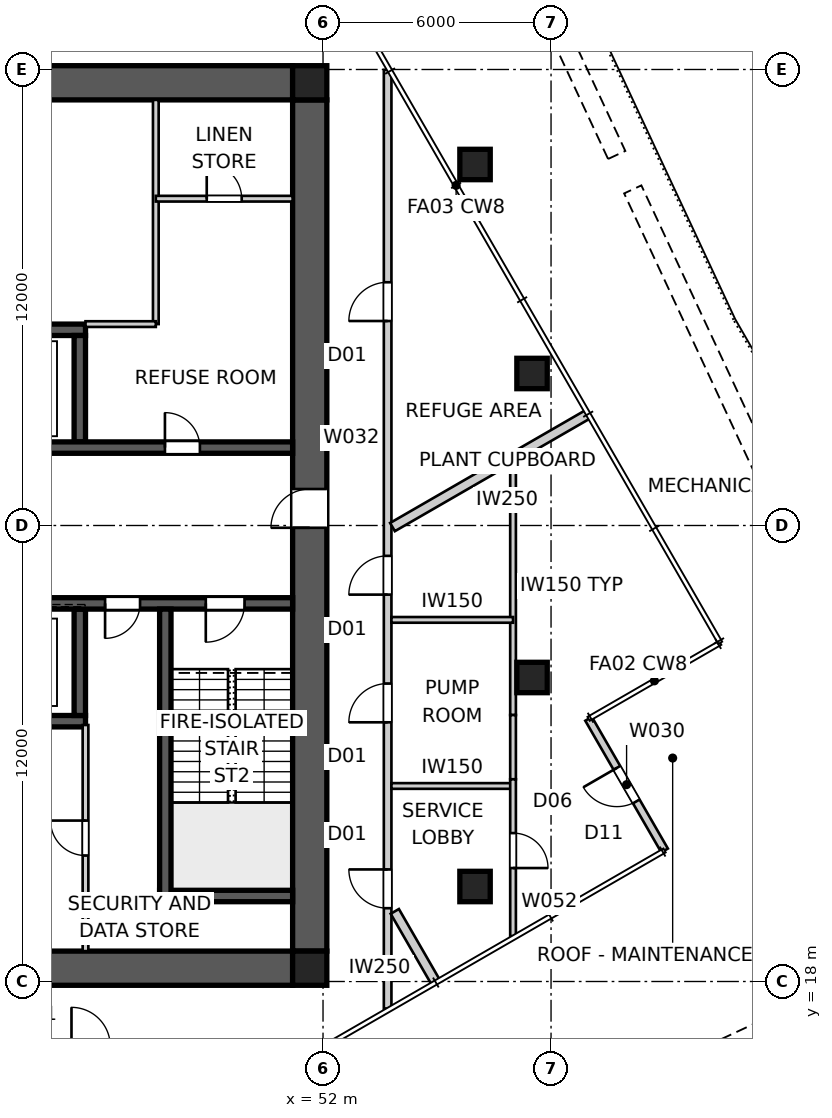
"""IFC4 building model, lengths in metres.
Left out: names, types, materials, properties, quantities, classifications, styles, units other than length and angle.
Written with IfcOpenShell. Run it as: python <this file> out.ifc"""

import sys

from ifc_helpers import new_model, si_unit, direction, frame, frame_2d, origin, origin_2d, place, context, subcontext, project, spatial, polyline, rectangle, outline, extrude, element, fill, save


model = new_model("IFC4")
c1 = context("Model", 3, precision=1e-05, world=origin(), true_north=direction((0.0, 1.0)))
c2 = subcontext(c1, "Body", "Model", "MODEL_VIEW")
j1 = project(units=[si_unit("LENGTHUNIT", "METRE"), si_unit("PLANEANGLEUNIT", "RADIAN")], contexts=[c1])
p1 = place(None, origin())
s1 = spatial("IfcSite", under=j1, at=p1, CompositionType="ELEMENT")
p2 = place(p1, origin())
s2 = spatial("IfcBuilding", under=s1, at=p2, CompositionType="ELEMENT")
p3 = place(p2, frame((0.0, 0.0, 203.2)))
s3 = spatial("IfcBuildingStorey", under=s2, at=p3, CompositionType="ELEMENT", Elevation=203.2)
for number, where, z_axis, x_axis in (
    (1, (28.8, 41.65, 0.0), (0.0, 0.0, 1.0), (1.0, 0.0, 0.0)),
    (2, (51.2, 18.35, 0.0), (0.0, 0.0, 1.0), (-1.0, 0.0, 0.0)),
):
    element("IfcWall", number, at=place(p3, frame(where, z_axis=z_axis, x_axis=x_axis)), inside=s3, PredefinedType="SHEAR", context=c2, shape_type="SweptSolid", body=[
        extrude(outline(polyline([(0.0, -0.45), (22.4, -0.45), (22.4, -0.025), (22.85, -0.025), (22.85, 0.025), (22.4, 0.025), (22.4, 0.45), (0.0, 0.45), (0.0, 0.025), (-0.45, 0.025), (-0.45, -0.025), (0.0, -0.025), (0.0, -0.45)])), origin(), (0.0, 0.0, 1.0), 5.0),
    ])
p4 = place(p3, frame((51.65, 18.8, 0.0), z_axis=(0.0, 0.0, 1.0), x_axis=(0.0, 1.0, 0.0)))
e3 = element("IfcWall", 3, at=p4, inside=s3, PredefinedType="SHEAR", context=c2, shape_type="SweptSolid", body=[
    extrude(outline(polyline([(0.0, -0.45), (22.4, -0.45), (22.4, -0.025), (22.85, -0.025), (22.85, 0.025), (22.4, 0.025), (22.4, 0.45), (0.0, 0.45), (0.0, 0.025), (-0.45, 0.025), (-0.45, -0.025), (0.0, -0.025), (0.0, -0.45)])), origin(), (0.0, 0.0, 1.0), 5.0),
])
p5 = place(p4, frame((11.14, 0.0, 0.0)))
e4 = element("IfcOpeningElement", 4, at=p5, cuts=e3, PredefinedType="OPENING", context=c2, shape_type="SweptSolid", body=[
    extrude(rectangle(XDim=1.02, YDim=2.4, at=frame_2d((0.51, 1.2))), frame((0.0, 0.46, 0.0), z_axis=(0.0, -1.0, 0.0), x_axis=(1.0, 0.0, 0.0)), (0.0, 0.0, 1.0), 0.92),
])
p6 = place(p3, frame((28.8, 32.05, 0.0), z_axis=(0.0, 0.0, 1.0), x_axis=(1.0, 0.0, 0.0)))
e5 = element("IfcWall", 5, at=p6, inside=s3, PredefinedType="SHEAR", context=c2, shape_type="SweptSolid", body=[
    extrude(rectangle(XDim=22.4, YDim=0.3, at=frame_2d((11.2, 0.0))), origin(), (0.0, 0.0, 1.0), 5.0),
])
p7 = place(p6, frame((19.04, 0.0, 0.0)))
e6 = element("IfcOpeningElement", 6, at=p7, cuts=e5, PredefinedType="OPENING", context=c2, shape_type="SweptSolid", body=[
    extrude(rectangle(XDim=0.92, YDim=2.1, at=frame_2d((0.46, 1.05))), frame((0.0, 0.16, 0.0), z_axis=(0.0, -1.0, 0.0), x_axis=(1.0, 0.0, 0.0)), (0.0, 0.0, 1.0), 0.32),
])
p8 = place(p6, frame((1.265, 0.0, 0.0)))
e7 = element("IfcOpeningElement", 7, at=p8, cuts=e5, PredefinedType="OPENING", context=c2, shape_type="SweptSolid", body=[
    extrude(rectangle(XDim=1.02, YDim=2.1, at=frame_2d((0.51, 1.05))), frame((0.0, 0.16, 0.0), z_axis=(0.0, -1.0, 0.0), x_axis=(1.0, 0.0, 0.0)), (0.0, 0.0, 1.0), 0.32),
])
p9 = place(p6, frame((4.015, 0.0, 0.0)))
e8 = element("IfcOpeningElement", 8, at=p9, cuts=e5, PredefinedType="OPENING", context=c2, shape_type="SweptSolid", body=[
    extrude(rectangle(XDim=0.92, YDim=2.1, at=frame_2d((0.46, 1.05))), frame((0.0, 0.16, 0.0), z_axis=(0.0, -1.0, 0.0), x_axis=(1.0, 0.0, 0.0)), (0.0, 0.0, 1.0), 0.32),
])
p10 = place(p6, frame((7.015, 0.0, 0.0)))
e9 = element("IfcOpeningElement", 9, at=p10, cuts=e5, PredefinedType="OPENING", context=c2, shape_type="SweptSolid", body=[
    extrude(rectangle(XDim=0.92, YDim=2.1, at=frame_2d((0.46, 1.05))), frame((0.0, 0.16, 0.0), z_axis=(0.0, -1.0, 0.0), x_axis=(1.0, 0.0, 0.0)), (0.0, 0.0, 1.0), 0.32),
])
p11 = place(p6, frame((9.34, 0.0, 0.0)))
e10 = element("IfcOpeningElement", 10, at=p11, cuts=e5, PredefinedType="OPENING", context=c2, shape_type="SweptSolid", body=[
    extrude(rectangle(XDim=0.92, YDim=2.1, at=frame_2d((0.46, 1.05))), frame((0.0, 0.16, 0.0), z_axis=(0.0, -1.0, 0.0), x_axis=(1.0, 0.0, 0.0)), (0.0, 0.0, 1.0), 0.32),
])
p12 = place(p6, frame((14.85, 0.0, 0.0)))
e11 = element("IfcOpeningElement", 11, at=p12, cuts=e5, PredefinedType="OPENING", context=c2, shape_type="SweptSolid", body=[
    extrude(rectangle(XDim=1.1, YDim=2.1, at=frame_2d((0.55, 1.05))), frame((0.0, 0.16, 0.0), z_axis=(0.0, -1.0, 0.0), x_axis=(1.0, 0.0, 0.0)), (0.0, 0.0, 1.0), 0.32),
])
p13 = place(p3, frame((51.2, 27.95, 0.0), z_axis=(0.0, 0.0, 1.0), x_axis=(-1.0, 0.0, 0.0)))
e12 = element("IfcWall", 12, at=p13, inside=s3, PredefinedType="SHEAR", context=c2, shape_type="SweptSolid", body=[
    extrude(rectangle(XDim=22.4, YDim=0.3, at=frame_2d((11.2, 0.0))), origin(), (0.0, 0.0, 1.0), 5.0),
])
p14 = place(p13, frame((19.04, 0.0, 0.0)))
e13 = element("IfcOpeningElement", 13, at=p14, cuts=e12, PredefinedType="OPENING", context=c2, shape_type="SweptSolid", body=[
    extrude(rectangle(XDim=0.92, YDim=2.1, at=frame_2d((0.46, 1.05))), frame((0.0, 0.16, 0.0), z_axis=(0.0, -1.0, 0.0), x_axis=(1.0, 0.0, 0.0)), (0.0, 0.0, 1.0), 0.32),
])
p15 = place(p13, frame((1.265, 0.0, 0.0)))
e14 = element("IfcOpeningElement", 14, at=p15, cuts=e12, PredefinedType="OPENING", context=c2, shape_type="SweptSolid", body=[
    extrude(rectangle(XDim=1.02, YDim=2.1, at=frame_2d((0.51, 1.05))), frame((0.0, 0.16, 0.0), z_axis=(0.0, -1.0, 0.0), x_axis=(1.0, 0.0, 0.0)), (0.0, 0.0, 1.0), 0.32),
])
p16 = place(p13, frame((4.015, 0.0, 0.0)))
e15 = element("IfcOpeningElement", 15, at=p16, cuts=e12, PredefinedType="OPENING", context=c2, shape_type="SweptSolid", body=[
    extrude(rectangle(XDim=0.92, YDim=2.1, at=frame_2d((0.46, 1.05))), frame((0.0, 0.16, 0.0), z_axis=(0.0, -1.0, 0.0), x_axis=(1.0, 0.0, 0.0)), (0.0, 0.0, 1.0), 0.32),
])
p17 = place(p13, frame((6.45, 0.0, 0.0)))
e16 = element("IfcOpeningElement", 16, at=p17, cuts=e12, PredefinedType="OPENING", context=c2, shape_type="SweptSolid", body=[
    extrude(rectangle(XDim=1.1, YDim=2.1, at=frame_2d((0.55, 1.05))), frame((0.0, 0.16, 0.0), z_axis=(0.0, -1.0, 0.0), x_axis=(1.0, 0.0, 0.0)), (0.0, 0.0, 1.0), 0.32),
])
p18 = place(p13, frame((9.25, 0.0, 0.0)))
e17 = element("IfcOpeningElement", 17, at=p18, cuts=e12, PredefinedType="OPENING", context=c2, shape_type="SweptSolid", body=[
    extrude(rectangle(XDim=1.1, YDim=2.1, at=frame_2d((0.55, 1.05))), frame((0.0, 0.16, 0.0), z_axis=(0.0, -1.0, 0.0), x_axis=(1.0, 0.0, 0.0)), (0.0, 0.0, 1.0), 0.32),
])
p19 = place(p13, frame((14.85, 0.0, 0.0)))
e18 = element("IfcOpeningElement", 18, at=p19, cuts=e12, PredefinedType="OPENING", context=c2, shape_type="SweptSolid", body=[
    extrude(rectangle(XDim=1.1, YDim=2.1, at=frame_2d((0.55, 1.05))), frame((0.0, 0.16, 0.0), z_axis=(0.0, -1.0, 0.0), x_axis=(1.0, 0.0, 0.0)), (0.0, 0.0, 1.0), 0.32),
])
for number, where, z_axis, x_axis in (
    (19, (34.25, 35.15, 0.0), (0.0, 0.0, 1.0), (1.0, 0.0, 0.0)),
    (20, (45.75, 24.85, 0.0), (0.0, 0.0, 1.0), (-1.0, 0.0, 0.0)),
):
    element("IfcWall", number, at=place(p3, frame(where, z_axis=z_axis, x_axis=x_axis)), inside=s3, PredefinedType="SHEAR", context=c2, shape_type="SweptSolid", body=[
        extrude(rectangle(XDim=11.5, YDim=0.3, at=frame_2d((5.75, 0.0))), origin(), (0.0, 0.0, 1.0), 5.0),
    ])
for number, where, z_axis, x_axis in (
    (21, (45.6, 27.8, 0.0), (0.0, 0.0, 1.0), (0.0, -1.0, 0.0)),
    (22, (45.6, 32.2, 0.0), (0.0, 0.0, 1.0), (0.0, 1.0, 0.0)),
):
    element("IfcWall", number, at=place(p3, frame(where, z_axis=z_axis, x_axis=x_axis)), inside=s3, PredefinedType="SHEAR", context=c2, shape_type="SweptSolid", body=[
        extrude(rectangle(XDim=2.8, YDim=0.3, at=frame_2d((1.4, 0.0))), origin(), (0.0, 0.0, 1.0), 5.0),
    ])
p20 = place(p3, frame((47.85, 27.8, 0.0), z_axis=(0.0, 0.0, 1.0), x_axis=(0.0, -1.0, 0.0)))
e23 = element("IfcWall", 23, at=p20, inside=s3, PredefinedType="SHEAR", context=c2, shape_type="SweptSolid", body=[
    extrude(rectangle(XDim=7.7, YDim=0.3, at=frame_2d((3.85, 0.0))), origin(), (0.0, 0.0, 1.0), 5.0),
])
p21 = place(p3, frame((51.2, 20.25, 0.0), z_axis=(0.0, 0.0, 1.0), x_axis=(-1.0, 0.0, 0.0)))
e24 = element("IfcWall", 24, at=p21, inside=s3, PredefinedType="SHEAR", context=c2, shape_type="SweptSolid", body=[
    extrude(rectangle(XDim=3.5, YDim=0.3, at=frame_2d((1.75, 0.0))), origin(), (0.0, 0.0, 1.0), 5.0),
])
for number, where, z_axis, x_axis in (
    (25, (51.65, 18.35, 0.0), (0.0, 0.0, 1.0), (1.0, 0.0, 0.0)),
    (26, (51.65, 41.65, 0.0), (0.0, 0.0, 1.0), (1.0, 0.0, 0.0)),
):
    element("IfcColumn", number, at=place(p3, frame(where, z_axis=z_axis, x_axis=x_axis)), inside=s3, PredefinedType="COLUMN", context=c2, shape_type="SweptSolid", body=[
        extrude(rectangle(XDim=0.9, YDim=0.9, at=origin_2d()), origin(), (0.0, 0.0, 1.0), 5.0),
    ])
for number, where, z_axis, x_axis in (
    (27, (57.5, 26.0, 0.0), (0.0, 0.0, 1.0), (1.0, 0.0, 0.0)),
    (28, (57.5, 34.0, 0.0), (0.0, 0.0, 1.0), (1.0, 0.0, 0.0)),
    (29, (56.0, 39.5, 0.0), (0.0, 0.0, 1.0), (1.0, 0.0, 0.0)),
    (30, (56.0, 20.5, 0.0), (0.0, 0.0, 1.0), (1.0, 0.0, 0.0)),
):
    element("IfcColumn", number, at=place(p3, frame(where, z_axis=z_axis, x_axis=x_axis)), inside=s3, PredefinedType="COLUMN", context=c2, shape_type="SweptSolid", body=[
        extrude(rectangle(XDim=0.8, YDim=0.8, at=origin_2d()), origin(), (0.0, 0.0, 1.0), 5.0),
    ])
p22 = place(p3, frame((60.988, 21.448, 0.0), z_axis=(0.0, 0.0, 1.0), x_axis=(-0.49999894854, 0.866026010844, 0.0)))
e31 = element("IfcWall", 31, at=p22, inside=s3, PredefinedType="SOLIDWALL", context=c2, shape_type="SweptSolid", body=[
    extrude(rectangle(XDim=4.0, YDim=0.2, at=frame_2d((2.0, 0.0))), origin(), (0.0, 0.0, 1.0), 4.85),
])
p23 = place(p22, frame((1.49, 0.0, 0.0)))
e32 = element("IfcOpeningElement", 32, at=p23, cuts=e31, PredefinedType="OPENING", context=c2, shape_type="SweptSolid", body=[
    extrude(rectangle(XDim=1.02, YDim=2.1, at=frame_2d((0.51, 1.05))), frame((0.0, 0.11, 0.0), z_axis=(0.0, -1.0, 0.0), x_axis=(1.0, 0.0, 0.0)), (0.0, 0.0, 1.0), 0.22),
])
p24 = place(p3, frame((53.7, 17.287, 0.0), z_axis=(0.0, 0.0, 1.0), x_axis=(0.0, 1.0, 0.0)))
e33 = element("IfcWall", 33, at=p24, inside=s3, PredefinedType="PARTITIONING", context=c2, shape_type="SweptSolid", body=[
    extrude(rectangle(XDim=24.704, YDim=0.2, at=frame_2d((12.352, 0.0))), origin(), (0.0, 0.0, 1.0), 4.85),
])
p25 = place(p24, frame((18.094, 0.0, 0.0)))
e34 = element("IfcOpeningElement", 34, at=p25, cuts=e33, PredefinedType="OPENING", context=c2, shape_type="SweptSolid", body=[
    extrude(rectangle(XDim=1.02, YDim=2.34, at=frame_2d((0.51, 1.17))), frame((0.0, 0.11, 0.0), z_axis=(0.0, -1.0, 0.0), x_axis=(1.0, 0.0, 0.0)), (0.0, 0.0, 1.0), 0.22),
])
p26 = place(p24, frame((2.642, 0.0, 0.0)))
e35 = element("IfcOpeningElement", 35, at=p26, cuts=e33, PredefinedType="OPENING", context=c2, shape_type="SweptSolid", body=[
    extrude(rectangle(XDim=1.02, YDim=2.34, at=frame_2d((0.51, 1.17))), frame((0.0, 0.11, 0.0), z_axis=(0.0, -1.0, 0.0), x_axis=(1.0, 0.0, 0.0)), (0.0, 0.0, 1.0), 0.22),
])
p27 = place(p24, frame((7.534, 0.0, 0.0)))
e36 = element("IfcOpeningElement", 36, at=p27, cuts=e33, PredefinedType="OPENING", context=c2, shape_type="SweptSolid", body=[
    extrude(rectangle(XDim=1.02, YDim=2.34, at=frame_2d((0.51, 1.17))), frame((0.0, 0.11, 0.0), z_axis=(0.0, -1.0, 0.0), x_axis=(1.0, 0.0, 0.0)), (0.0, 0.0, 1.0), 0.22),
])
p28 = place(p24, frame((10.894, 0.0, 0.0)))
e37 = element("IfcOpeningElement", 37, at=p28, cuts=e33, PredefinedType="OPENING", context=c2, shape_type="SweptSolid", body=[
    extrude(rectangle(XDim=1.02, YDim=2.34, at=frame_2d((0.51, 1.17))), frame((0.0, 0.11, 0.0), z_axis=(0.0, -1.0, 0.0), x_axis=(1.0, 0.0, 0.0)), (0.0, 0.0, 1.0), 0.22),
])
p29 = place(p3, frame((54.969, 17.973, 0.0), z_axis=(0.0, 0.0, 1.0), x_axis=(-0.500087501723, 0.865974878747, 0.0)))
e38 = element("IfcWall", 38, at=p29, inside=s3, PredefinedType="PARTITIONING", context=c2, shape_type="SweptSolid", body=[
    extrude(rectangle(XDim=2.161, YDim=0.25, at=frame_2d((1.081, 0.0))), origin(), (0.0, 0.0, 1.0), 4.85),
])
p30 = place(p3, frame((58.977, 32.931, 0.0), z_axis=(0.0, 0.0, 1.0), x_axis=(-0.866013262469, -0.500021028785, 0.0)))
e39 = element("IfcWall", 39, at=p30, inside=s3, PredefinedType="PARTITIONING", context=c2, shape_type="SweptSolid", body=[
    extrude(rectangle(XDim=5.946, YDim=0.25, at=frame_2d((2.973, 0.0))), origin(), (0.0, 0.0, 1.0), 4.85),
])
p31 = place(p3, frame((47.6, 41.2, 0.0), z_axis=(0.0, 0.0, 1.0), x_axis=(0.0, -1.0, 0.0)))
e40 = element("IfcWall", 40, at=p31, inside=s3, PredefinedType="SOLIDWALL", context=c2, shape_type="SweptSolid", body=[
    extrude(rectangle(XDim=5.9, YDim=0.15, at=frame_2d((2.95, 0.0))), origin(), (0.0, 0.0, 1.0), 4.85),
])
p32 = place(p3, frame((47.6, 35.3, 0.0), z_axis=(0.0, 0.0, 1.0), x_axis=(-1.0, 0.0, 0.0)))
e41 = element("IfcWall", 41, at=p32, inside=s3, PredefinedType="SOLIDWALL", context=c2, shape_type="SweptSolid", body=[
    extrude(rectangle(XDim=1.85, YDim=0.15, at=frame_2d((0.925, 0.0))), origin(), (0.0, 0.0, 1.0), 4.85),
])
p33 = place(p3, frame((47.6, 38.6, 0.0), z_axis=(0.0, 0.0, 1.0), x_axis=(1.0, 0.0, 0.0)))
e42 = element("IfcWall", 42, at=p33, inside=s3, PredefinedType="SOLIDWALL", context=c2, shape_type="SweptSolid", body=[
    extrude(rectangle(XDim=3.6, YDim=0.15, at=frame_2d((1.8, 0.0))), origin(), (0.0, 0.0, 1.0), 4.85),
])
p34 = place(p33, frame((1.34, 0.0, 0.0)))
e43 = element("IfcOpeningElement", 43, at=p34, cuts=e42, PredefinedType="OPENING", context=c2, shape_type="SweptSolid", body=[
    extrude(rectangle(XDim=0.92, YDim=2.1, at=frame_2d((0.46, 1.05))), frame((0.0, 0.085, 0.0), z_axis=(0.0, -1.0, 0.0), x_axis=(1.0, 0.0, 0.0)), (0.0, 0.0, 1.0), 0.17),
])
p35 = place(p3, frame((45.75, 18.8, 0.0), z_axis=(0.0, 0.0, 1.0), x_axis=(0.0, 1.0, 0.0)))
e44 = element("IfcWall", 44, at=p35, inside=s3, PredefinedType="SOLIDWALL", context=c2, shape_type="SweptSolid", body=[
    extrude(rectangle(XDim=5.95, YDim=0.15, at=frame_2d((2.975, 0.0))), origin(), (0.0, 0.0, 1.0), 4.85),
])
p36 = place(p35, frame((2.515, 0.0, 0.0)))
e45 = element("IfcOpeningElement", 45, at=p36, cuts=e44, PredefinedType="OPENING", context=c2, shape_type="SweptSolid", body=[
    extrude(rectangle(XDim=0.92, YDim=2.1, at=frame_2d((0.46, 1.05))), frame((0.0, 0.085, 0.0), z_axis=(0.0, -1.0, 0.0), x_axis=(1.0, 0.0, 0.0)), (0.0, 0.0, 1.0), 0.17),
])
p37 = place(p3, frame((53.8, 23.145, 0.0), z_axis=(0.0, 0.0, 1.0), x_axis=(1.0, 0.0, 0.0)))
e46 = element("IfcWall", 46, at=p37, inside=s3, PredefinedType="SOLIDWALL", context=c2, shape_type="SweptSolid", body=[
    extrude(rectangle(XDim=3.2, YDim=0.15, at=frame_2d((1.6, 0.0))), origin(), (0.0, 0.0, 1.0), 4.85),
])
p38 = place(p3, frame((57.0, 31.79, 0.0), z_axis=(0.0, 0.0, 1.0), x_axis=(0.0, -1.0, 0.0)))
e47 = element("IfcWall", 47, at=p38, inside=s3, PredefinedType="SOLIDWALL", context=c2, shape_type="SweptSolid", body=[
    extrude(rectangle(XDim=6.778, YDim=0.15, at=frame_2d((3.389, 0.0))), origin(), (0.0, 0.0, 1.0), 4.85),
])
p39 = place(p3, frame((57.0, 25.012, 0.0), z_axis=(0.0, 0.0, 1.0), x_axis=(0.0, -1.0, 0.0)))
e48 = element("IfcWall", 48, at=p39, inside=s3, PredefinedType="SOLIDWALL", context=c2, shape_type="SweptSolid", body=[
    extrude(rectangle(XDim=1.69, YDim=0.15, at=frame_2d((0.845, 0.0))), origin(), (0.0, 0.0, 1.0), 3.85),
])
p40 = place(p3, frame((57.0, 23.322, 0.0), z_axis=(0.0, 0.0, 1.0), x_axis=(0.0, -1.0, 0.0)))
e49 = element("IfcWall", 49, at=p40, inside=s3, PredefinedType="SOLIDWALL", context=c2, shape_type="SweptSolid", body=[
    extrude(rectangle(XDim=4.13, YDim=0.15, at=frame_2d((2.065, 0.0))), origin(), (0.0, 0.0, 1.0), 4.85),
])
p41 = place(p40, frame((1.416, 0.0, 0.0)))
e50 = element("IfcOpeningElement", 50, at=p41, cuts=e49, PredefinedType="OPENING", context=c2, shape_type="SweptSolid", body=[
    extrude(rectangle(XDim=0.92, YDim=2.1, at=frame_2d((0.46, 1.05))), frame((0.0, 0.085, 0.0), z_axis=(0.0, -1.0, 0.0), x_axis=(1.0, 0.0, 0.0)), (0.0, 0.0, 1.0), 0.17),
])
p42 = place(p3, frame((53.8, 27.516, 0.0), z_axis=(0.0, 0.0, 1.0), x_axis=(1.0, 0.0, 0.0)))
e51 = element("IfcWall", 51, at=p42, inside=s3, PredefinedType="SOLIDWALL", context=c2, shape_type="SweptSolid", body=[
    extrude(rectangle(XDim=3.2, YDim=0.15, at=frame_2d((1.6, 0.0))), origin(), (0.0, 0.0, 1.0), 4.85),
])
p43 = place(p23, origin())
e52 = element("IfcDoor", 52, at=p43, inside=s3, OperationType="SINGLE_SWING_RIGHT", PredefinedType="DOOR", context=c2, shape_type="SweptSolid", body=[
    extrude(rectangle(XDim=1.02, YDim=2.1, at=frame_2d((0.51, 1.05))), frame((0.0, 0.025, 0.0), z_axis=(0.0, -1.0, 0.0), x_axis=(1.0, 0.0, 0.0)), (0.0, 0.0, 1.0), 0.05),
])
fill(e32, e52)
p44 = place(p7, origin())
e53 = element("IfcDoor", 53, at=p44, inside=s3, OperationType="SINGLE_SWING_LEFT", PredefinedType="DOOR", context=c2, shape_type="SweptSolid", body=[
    extrude(rectangle(XDim=0.92, YDim=2.1, at=frame_2d((0.46, 1.05))), frame((0.0, 0.025, 0.0), z_axis=(0.0, -1.0, 0.0), x_axis=(1.0, 0.0, 0.0)), (0.0, 0.0, 1.0), 0.05),
])
fill(e6, e53)
p45 = place(p15, origin())
e54 = element("IfcDoor", 54, at=p45, inside=s3, OperationType="SINGLE_SWING_RIGHT", PredefinedType="DOOR", context=c2, shape_type="SweptSolid", body=[
    extrude(rectangle(XDim=1.02, YDim=2.1, at=frame_2d((0.51, 1.05))), frame((0.0, 0.025, 0.0), z_axis=(0.0, -1.0, 0.0), x_axis=(1.0, 0.0, 0.0)), (0.0, 0.0, 1.0), 0.05),
])
fill(e14, e54)
p46 = place(p16, origin())
e55 = element("IfcDoor", 55, at=p46, inside=s3, OperationType="SINGLE_SWING_RIGHT", PredefinedType="DOOR", context=c2, shape_type="SweptSolid", body=[
    extrude(rectangle(XDim=0.92, YDim=2.1, at=frame_2d((0.46, 1.05))), frame((0.0, 0.025, 0.0), z_axis=(0.0, -1.0, 0.0), x_axis=(1.0, 0.0, 0.0)), (0.0, 0.0, 1.0), 0.05),
])
fill(e15, e55)
p47 = place(p25, origin())
e56 = element("IfcDoor", 56, at=p47, inside=s3, OperationType="SINGLE_SWING_LEFT", PredefinedType="DOOR", context=c2, shape_type="SweptSolid", body=[
    extrude(rectangle(XDim=1.02, YDim=2.34, at=frame_2d((0.51, 1.17))), frame((0.0, 0.025, 0.0), z_axis=(0.0, -1.0, 0.0), x_axis=(1.0, 0.0, 0.0)), (0.0, 0.0, 1.0), 0.05),
])
fill(e34, e56)
p48 = place(p26, origin())
e57 = element("IfcDoor", 57, at=p48, inside=s3, OperationType="SINGLE_SWING_RIGHT", PredefinedType="DOOR", context=c2, shape_type="SweptSolid", body=[
    extrude(rectangle(XDim=1.02, YDim=2.34, at=frame_2d((0.51, 1.17))), frame((0.0, 0.025, 0.0), z_axis=(0.0, -1.0, 0.0), x_axis=(1.0, 0.0, 0.0)), (0.0, 0.0, 1.0), 0.05),
])
fill(e35, e57)
p49 = place(p27, origin())
e58 = element("IfcDoor", 58, at=p49, inside=s3, OperationType="SINGLE_SWING_LEFT", PredefinedType="DOOR", context=c2, shape_type="SweptSolid", body=[
    extrude(rectangle(XDim=1.02, YDim=2.34, at=frame_2d((0.51, 1.17))), frame((0.0, 0.025, 0.0), z_axis=(0.0, -1.0, 0.0), x_axis=(1.0, 0.0, 0.0)), (0.0, 0.0, 1.0), 0.05),
])
fill(e36, e58)
p50 = place(p28, origin())
e59 = element("IfcDoor", 59, at=p50, inside=s3, OperationType="SINGLE_SWING_LEFT", PredefinedType="DOOR", context=c2, shape_type="SweptSolid", body=[
    extrude(rectangle(XDim=1.02, YDim=2.34, at=frame_2d((0.51, 1.17))), frame((0.0, 0.025, 0.0), z_axis=(0.0, -1.0, 0.0), x_axis=(1.0, 0.0, 0.0)), (0.0, 0.0, 1.0), 0.05),
])
fill(e37, e59)
p51 = place(p34, origin())
e60 = element("IfcDoor", 60, at=p51, inside=s3, OperationType="SINGLE_SWING_LEFT", PredefinedType="DOOR", context=c2, shape_type="SweptSolid", body=[
    extrude(rectangle(XDim=0.92, YDim=2.1, at=frame_2d((0.46, 1.05))), frame((0.0, 0.025, 0.0), z_axis=(0.0, -1.0, 0.0), x_axis=(1.0, 0.0, 0.0)), (0.0, 0.0, 1.0), 0.05),
])
fill(e43, e60)
p52 = place(p36, origin())
e61 = element("IfcDoor", 61, at=p52, inside=s3, OperationType="SINGLE_SWING_RIGHT", PredefinedType="DOOR", context=c2, shape_type="SweptSolid", body=[
    extrude(rectangle(XDim=0.92, YDim=2.1, at=frame_2d((0.46, 1.05))), frame((0.0, 0.025, 0.0), z_axis=(0.0, -1.0, 0.0), x_axis=(1.0, 0.0, 0.0)), (0.0, 0.0, 1.0), 0.05),
])
fill(e45, e61)
p53 = place(p41, origin())
e62 = element("IfcDoor", 62, at=p53, inside=s3, OperationType="SINGLE_SWING_RIGHT", PredefinedType="DOOR", context=c2, shape_type="SweptSolid", body=[
    extrude(rectangle(XDim=0.92, YDim=2.1, at=frame_2d((0.46, 1.05))), frame((0.0, 0.025, 0.0), z_axis=(0.0, -1.0, 0.0), x_axis=(1.0, 0.0, 0.0)), (0.0, 0.0, 1.0), 0.05),
])
fill(e50, e62)
p54 = place(p5, origin())
e63 = element("IfcDoor", 63, at=p54, inside=s3, OperationType="SINGLE_SWING_LEFT", PredefinedType="DOOR", context=c2, shape_type="SweptSolid", body=[
    extrude(rectangle(XDim=1.02, YDim=2.4, at=frame_2d((0.51, 1.2))), frame((0.0, 0.025, 0.0), z_axis=(0.0, -1.0, 0.0), x_axis=(1.0, 0.0, 0.0)), (0.0, 0.0, 1.0), 0.05),
])
fill(e4, e63)
save(model, sys.argv[1])
